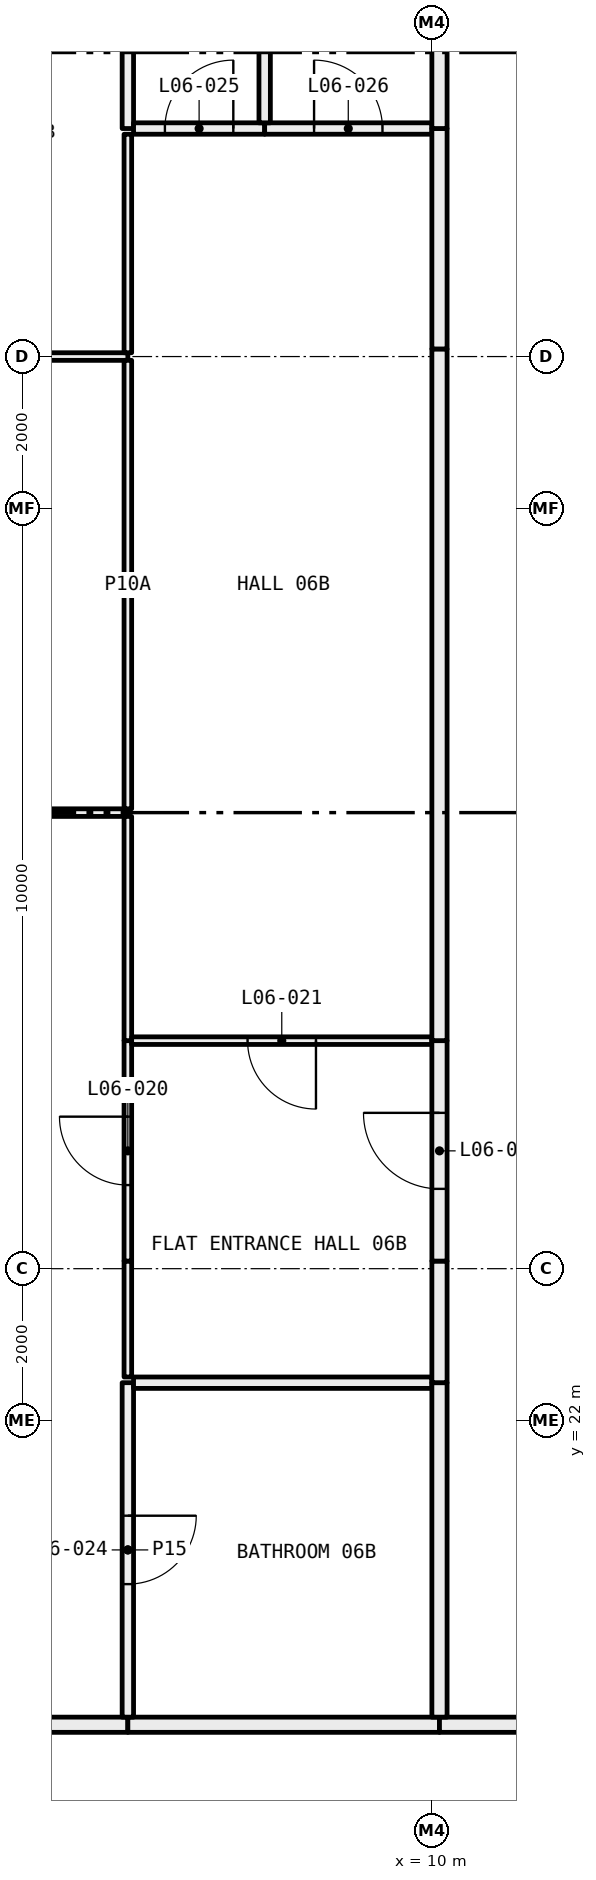
"""IFC4 building model, lengths in metres.
Left out: names, types, materials, properties, quantities, classifications, styles, units other than length and angle.
Written with IfcOpenShell. Run it as: python <this file> out.ifc"""

import sys

from ifc_helpers import new_model, si_unit, direction, frame, frame_2d, origin, place, context, subcontext, project, spatial, rectangle, extrude, element, fill, save


model = new_model("IFC4")
c1 = context("Model", 3, precision=1e-05, world=origin(), true_north=direction((0.0, 1.0)))
c2 = subcontext(c1, "Body", "Model", "MODEL_VIEW")
j1 = project(units=[si_unit("LENGTHUNIT", "METRE"), si_unit("PLANEANGLEUNIT", "RADIAN")], contexts=[c1])
p1 = place(None, origin())
s1 = spatial("IfcSite", under=j1, at=p1, CompositionType="ELEMENT")
p2 = place(p1, origin())
s2 = spatial("IfcBuilding", under=s1, at=p2, CompositionType="ELEMENT")
p3 = place(p2, frame((0.0, 0.0, 33.45)))
s3 = spatial("IfcBuildingStorey", under=s2, at=p3, CompositionType="ELEMENT", Elevation=33.45)
p4 = place(p3, frame((6.0, 18.0, 0.0), z_axis=(0.0, 0.0, 1.0), x_axis=(-1.0, 0.0, 0.0)))
e1 = element("IfcWall", 1, at=p4, inside=s3, PredefinedType="PARTITIONING", context=c2, shape_type="SweptSolid", body=[
    extrude(rectangle(XDim=5.28, YDim=0.2, at=frame_2d((2.64, 0.0))), origin(), (0.0, 0.0, 1.0), 3.05),
])
p5 = place(p3, frame((10.1, 18.0, 0.0), z_axis=(0.0, 0.0, 1.0), x_axis=(-1.0, 0.0, 0.0)))
e2 = element("IfcWall", 2, at=p5, inside=s3, PredefinedType="PARTITIONING", context=c2, shape_type="SweptSolid", body=[
    extrude(rectangle(XDim=4.1, YDim=0.2, at=frame_2d((2.05, 0.0))), origin(), (0.0, 0.0, 1.0), 3.05),
])
p6 = place(p3, frame((13.5, 18.0, 0.0), z_axis=(0.0, 0.0, 1.0), x_axis=(-1.0, 0.0, 0.0)))
e3 = element("IfcWall", 3, at=p6, inside=s3, PredefinedType="PARTITIONING", context=c2, shape_type="SweptSolid", body=[
    extrude(rectangle(XDim=3.4, YDim=0.2, at=frame_2d((1.7, 0.0))), origin(), (0.0, 0.0, 1.0), 3.05),
])
p7 = place(p3, frame((6.0, 30.0, 0.0), z_axis=(0.0, 0.0, 1.0), x_axis=(-1.0, 0.0, 0.0)))
e4 = element("IfcWall", 4, at=p7, inside=s3, PredefinedType="PARTITIONING", context=c2, shape_type="SweptSolid", body=[
    extrude(rectangle(XDim=5.28, YDim=0.1, at=frame_2d((2.64, 0.0))), origin(), (0.0, 0.0, 1.0), 3.05),
])
p8 = place(p7, frame((2.19, 0.0, 0.0)))
e5 = element("IfcOpeningElement", 5, at=p8, cuts=e4, PredefinedType="OPENING", context=c2, shape_type="SweptSolid", body=[
    extrude(rectangle(XDim=0.9, YDim=2.1, at=frame_2d((0.45, 1.05))), frame((0.0, 0.06, 0.0), z_axis=(0.0, -1.0, 0.0), x_axis=(1.0, 0.0, 0.0)), (0.0, 0.0, 1.0), 0.12),
])
p9 = place(p3, frame((6.0, 18.1, 0.0), z_axis=(0.0, 0.0, 1.0), x_axis=(0.0, 1.0, 0.0)))
e6 = element("IfcWall", 6, at=p9, inside=s3, PredefinedType="PARTITIONING", context=c2, shape_type="SweptSolid", body=[
    extrude(rectangle(XDim=4.4, YDim=0.15, at=frame_2d((2.2, 0.0))), origin(), (0.0, 0.0, 1.0), 3.05),
])
p10 = place(p9, frame((1.75, 0.0, 0.0)))
e7 = element("IfcOpeningElement", 7, at=p10, cuts=e6, PredefinedType="OPENING", context=c2, shape_type="SweptSolid", body=[
    extrude(rectangle(XDim=0.9, YDim=2.1, at=frame_2d((0.45, 1.05))), frame((0.0, 0.085, 0.0), z_axis=(0.0, -1.0, 0.0), x_axis=(1.0, 0.0, 0.0)), (0.0, 0.0, 1.0), 0.17),
])
p11 = place(p3, frame((6.0, 22.575, 0.0), z_axis=(0.0, 0.0, 1.0), x_axis=(0.0, 1.0, 0.0)))
e8 = element("IfcWall", 8, at=p11, inside=s3, PredefinedType="PARTITIONING", context=c2, shape_type="SweptSolid", body=[
    extrude(rectangle(XDim=1.525, YDim=0.1, at=frame_2d((0.763, 0.0))), origin(), (0.0, 0.0, 1.0), 2.45),
])
p12 = place(p3, frame((6.0, 24.1, 0.0), z_axis=(0.0, 0.0, 1.0), x_axis=(0.0, 1.0, 0.0)))
e9 = element("IfcWall", 9, at=p12, inside=s3, PredefinedType="PARTITIONING", context=c2, shape_type="SweptSolid", body=[
    extrude(rectangle(XDim=2.9, YDim=0.1, at=frame_2d((1.45, 0.0))), origin(), (0.0, 0.0, 1.0), 3.05),
])
p13 = place(p12, frame((1.0, 0.0, 0.0)))
e10 = element("IfcOpeningElement", 10, at=p13, cuts=e9, PredefinedType="OPENING", context=c2, shape_type="SweptSolid", body=[
    extrude(rectangle(XDim=0.9, YDim=2.1, at=frame_2d((0.45, 1.05))), frame((0.0, 0.06, 0.0), z_axis=(0.0, -1.0, 0.0), x_axis=(1.0, 0.0, 0.0)), (0.0, 0.0, 1.0), 0.12),
])
p14 = place(p3, frame((6.0, 27.0, 0.0), z_axis=(0.0, 0.0, 1.0), x_axis=(0.0, 1.0, 0.0)))
e11 = element("IfcWall", 11, at=p14, inside=s3, PredefinedType="PARTITIONING", context=c2, shape_type="SweptSolid", body=[
    extrude(rectangle(XDim=2.95, YDim=0.1, at=frame_2d((1.475, 0.0))), origin(), (0.0, 0.0, 1.0), 3.05),
])
p15 = place(p3, frame((6.0, 36.0, 0.0), z_axis=(0.0, 0.0, 1.0), x_axis=(-1.0, 0.0, 0.0)))
e12 = element("IfcWall", 12, at=p15, inside=s3, PredefinedType="PARTITIONING", context=c2, shape_type="SweptSolid", body=[
    extrude(rectangle(XDim=5.28, YDim=0.1, at=frame_2d((2.64, 0.0))), origin(), (0.0, 0.0, 1.0), 2.45),
])
p16 = place(p15, frame((2.19, 0.0, 0.0)))
e13 = element("IfcOpeningElement", 13, at=p16, cuts=e12, PredefinedType="OPENING", context=c2, shape_type="SweptSolid", body=[
    extrude(rectangle(XDim=0.9, YDim=2.1, at=frame_2d((0.45, 1.05))), frame((0.0, 0.06, 0.0), z_axis=(0.0, -1.0, 0.0), x_axis=(1.0, 0.0, 0.0)), (0.0, 0.0, 1.0), 0.12),
])
p17 = place(p3, frame((6.0, 30.05, 0.0), z_axis=(0.0, 0.0, 1.0), x_axis=(0.0, 1.0, 0.0)))
e14 = element("IfcWall", 14, at=p17, inside=s3, PredefinedType="PARTITIONING", context=c2, shape_type="SweptSolid", body=[
    extrude(rectangle(XDim=5.9, YDim=0.1, at=frame_2d((2.95, 0.0))), origin(), (0.0, 0.0, 1.0), 2.45),
])
p18 = place(p3, frame((6.0, 36.05, 0.0), z_axis=(0.0, 0.0, 1.0), x_axis=(0.0, 1.0, 0.0)))
e15 = element("IfcWall", 15, at=p18, inside=s3, PredefinedType="PARTITIONING", context=c2, shape_type="SweptSolid", body=[
    extrude(rectangle(XDim=2.875, YDim=0.1, at=frame_2d((1.438, 0.0))), origin(), (0.0, 0.0, 1.0), 2.45),
])
p19 = place(p3, frame((6.0, 39.0, 0.0), z_axis=(0.0, 0.0, 1.0), x_axis=(0.0, 1.0, 0.0)))
e16 = element("IfcWall", 16, at=p19, inside=s3, PredefinedType="PARTITIONING", context=c2, shape_type="SweptSolid", body=[
    extrude(rectangle(XDim=2.28, YDim=0.15, at=frame_2d((1.14, 0.0))), origin(), (0.0, 0.0, 1.0), 3.05),
])
p20 = place(p3, frame((10.0, 22.5, 0.0), z_axis=(0.0, 0.0, 1.0), x_axis=(-1.0, 0.0, 0.0)))
e17 = element("IfcWall", 17, at=p20, inside=s3, PredefinedType="PARTITIONING", context=c2, shape_type="SweptSolid", body=[
    extrude(rectangle(XDim=3.925, YDim=0.15, at=frame_2d((1.962, 0.0))), origin(), (0.0, 0.0, 1.0), 3.05),
])
p21 = place(p3, frame((10.1, 18.1, 0.0), z_axis=(0.0, 0.0, 1.0), x_axis=(0.0, 1.0, 0.0)))
e18 = element("IfcWall", 18, at=p21, inside=s3, PredefinedType="PARTITIONING", context=c2, shape_type="SweptSolid", body=[
    extrude(rectangle(XDim=4.4, YDim=0.2, at=frame_2d((2.2, 0.0))), origin(), (0.0, 0.0, 1.0), 3.05),
])
p22 = place(p3, frame((10.0, 27.0, 0.0), z_axis=(0.0, 0.0, 1.0), x_axis=(-1.0, 0.0, 0.0)))
e19 = element("IfcWall", 19, at=p22, inside=s3, PredefinedType="PARTITIONING", context=c2, shape_type="SweptSolid", body=[
    extrude(rectangle(XDim=3.95, YDim=0.1, at=frame_2d((1.975, 0.0))), origin(), (0.0, 0.0, 1.0), 3.05),
])
p23 = place(p22, frame((1.525, 0.0, 0.0)))
e20 = element("IfcOpeningElement", 20, at=p23, cuts=e19, PredefinedType="OPENING", context=c2, shape_type="SweptSolid", body=[
    extrude(rectangle(XDim=0.9, YDim=2.1, at=frame_2d((0.45, 1.05))), frame((0.0, 0.06, 0.0), z_axis=(0.0, -1.0, 0.0), x_axis=(1.0, 0.0, 0.0)), (0.0, 0.0, 1.0), 0.12),
])
p24 = place(p3, frame((10.1, 22.5, 0.0), z_axis=(0.0, 0.0, 1.0), x_axis=(0.0, 1.0, 0.0)))
e21 = element("IfcWall", 21, at=p24, inside=s3, PredefinedType="PARTITIONING", context=c2, shape_type="SweptSolid", body=[
    extrude(rectangle(XDim=1.6, YDim=0.2, at=frame_2d((0.8, 0.0))), origin(), (0.0, 0.0, 1.0), 2.45),
])
p25 = place(p3, frame((10.1, 24.1, 0.0), z_axis=(0.0, 0.0, 1.0), x_axis=(0.0, 1.0, 0.0)))
e22 = element("IfcWall", 22, at=p25, inside=s3, PredefinedType="PARTITIONING", context=c2, shape_type="SweptSolid", body=[
    extrude(rectangle(XDim=2.9, YDim=0.2, at=frame_2d((1.45, 0.0))), origin(), (0.0, 0.0, 1.0), 3.05),
])
p26 = place(p25, frame((0.95, 0.0, 0.0)))
e23 = element("IfcOpeningElement", 23, at=p26, cuts=e22, PredefinedType="OPENING", context=c2, shape_type="SweptSolid", body=[
    extrude(rectangle(XDim=1.0, YDim=2.1, at=frame_2d((0.5, 1.05))), frame((0.0, 0.11, 0.0), z_axis=(0.0, -1.0, 0.0), x_axis=(1.0, 0.0, 0.0)), (0.0, 0.0, 1.0), 0.22),
])
p27 = place(p3, frame((7.8, 39.0, 0.0), z_axis=(0.0, 0.0, 1.0), x_axis=(-1.0, 0.0, 0.0)))
e24 = element("IfcWall", 24, at=p27, inside=s3, PredefinedType="PARTITIONING", context=c2, shape_type="SweptSolid", body=[
    extrude(rectangle(XDim=1.725, YDim=0.15, at=frame_2d((0.863, 0.0))), origin(), (0.0, 0.0, 1.0), 3.05),
])
p28 = place(p27, frame((0.413, 0.0, 0.0)))
e25 = element("IfcOpeningElement", 25, at=p28, cuts=e24, PredefinedType="OPENING", context=c2, shape_type="SweptSolid", body=[
    extrude(rectangle(XDim=0.9, YDim=2.1, at=frame_2d((0.45, 1.05))), frame((0.0, 0.085, 0.0), z_axis=(0.0, -1.0, 0.0), x_axis=(1.0, 0.0, 0.0)), (0.0, 0.0, 1.0), 0.17),
])
p29 = place(p3, frame((10.0, 39.0, 0.0), z_axis=(0.0, 0.0, 1.0), x_axis=(-1.0, 0.0, 0.0)))
e26 = element("IfcWall", 26, at=p29, inside=s3, PredefinedType="PARTITIONING", context=c2, shape_type="SweptSolid", body=[
    extrude(rectangle(XDim=2.2, YDim=0.15, at=frame_2d((1.1, 0.0))), origin(), (0.0, 0.0, 1.0), 3.05),
])
p30 = place(p29, frame((0.65, 0.0, 0.0)))
e27 = element("IfcOpeningElement", 27, at=p30, cuts=e26, PredefinedType="OPENING", context=c2, shape_type="SweptSolid", body=[
    extrude(rectangle(XDim=0.9, YDim=2.1, at=frame_2d((0.45, 1.05))), frame((0.0, 0.085, 0.0), z_axis=(0.0, -1.0, 0.0), x_axis=(1.0, 0.0, 0.0)), (0.0, 0.0, 1.0), 0.17),
])
p31 = place(p3, frame((10.1, 27.0, 0.0), z_axis=(0.0, 0.0, 1.0), x_axis=(0.0, 1.0, 0.0)))
e28 = element("IfcWall", 28, at=p31, inside=s3, PredefinedType="PARTITIONING", context=c2, shape_type="SweptSolid", body=[
    extrude(rectangle(XDim=9.1, YDim=0.2, at=frame_2d((4.55, 0.0))), origin(), (0.0, 0.0, 1.0), 2.45),
])
p32 = place(p3, frame((10.1, 36.1, 0.0), z_axis=(0.0, 0.0, 1.0), x_axis=(0.0, 1.0, 0.0)))
e29 = element("IfcWall", 29, at=p32, inside=s3, PredefinedType="PARTITIONING", context=c2, shape_type="SweptSolid", body=[
    extrude(rectangle(XDim=2.9, YDim=0.2, at=frame_2d((1.45, 0.0))), origin(), (0.0, 0.0, 1.0), 3.05),
])
p33 = place(p3, frame((7.8, 39.075, 0.0), z_axis=(0.0, 0.0, 1.0), x_axis=(0.0, 1.0, 0.0)))
e30 = element("IfcWall", 30, at=p33, inside=s3, PredefinedType="PARTITIONING", context=c2, shape_type="SweptSolid", body=[
    extrude(rectangle(XDim=2.825, YDim=0.15, at=frame_2d((1.413, 0.0))), origin(), (0.0, 0.0, 1.0), 3.05),
])
p34 = place(p3, frame((10.1, 39.0, 0.0), z_axis=(0.0, 0.0, 1.0), x_axis=(0.0, 1.0, 0.0)))
e31 = element("IfcWall", 31, at=p34, inside=s3, PredefinedType="PARTITIONING", context=c2, shape_type="SweptSolid", body=[
    extrude(rectangle(XDim=2.9, YDim=0.2, at=frame_2d((1.45, 0.0))), origin(), (0.0, 0.0, 1.0), 3.05),
])
p35 = place(p26, origin())
e32 = element("IfcDoor", 32, at=p35, inside=s3, OperationType="SINGLE_SWING_LEFT", PredefinedType="DOOR", context=c2, shape_type="SweptSolid", body=[
    extrude(rectangle(XDim=1.0, YDim=2.1, at=frame_2d((0.5, 1.05))), frame((0.0, 0.025, 0.0), z_axis=(0.0, -1.0, 0.0), x_axis=(1.0, 0.0, 0.0)), (0.0, 0.0, 1.0), 0.05),
])
fill(e23, e32)
p36 = place(p13, origin())
e33 = element("IfcDoor", 33, at=p36, inside=s3, OperationType="SINGLE_SWING_LEFT", PredefinedType="DOOR", context=c2, shape_type="SweptSolid", body=[
    extrude(rectangle(XDim=0.9, YDim=2.1, at=frame_2d((0.45, 1.05))), frame((0.0, 0.025, 0.0), z_axis=(0.0, -1.0, 0.0), x_axis=(1.0, 0.0, 0.0)), (0.0, 0.0, 1.0), 0.05),
])
fill(e10, e33)
p37 = place(p23, origin())
e34 = element("IfcDoor", 34, at=p37, inside=s3, OperationType="SINGLE_SWING_RIGHT", PredefinedType="DOOR", context=c2, shape_type="SweptSolid", body=[
    extrude(rectangle(XDim=0.9, YDim=2.1, at=frame_2d((0.45, 1.05))), frame((0.0, 0.025, 0.0), z_axis=(0.0, -1.0, 0.0), x_axis=(1.0, 0.0, 0.0)), (0.0, 0.0, 1.0), 0.05),
])
fill(e20, e34)
p38 = place(p10, frame((0.9, 0.0, 0.0), x_axis=(-1.0, 0.0, 0.0)))
e35 = element("IfcDoor", 35, at=p38, inside=s3, OperationType="SINGLE_SWING_RIGHT", PredefinedType="DOOR", context=c2, shape_type="SweptSolid", body=[
    extrude(rectangle(XDim=0.9, YDim=2.1, at=frame_2d((0.45, 1.05))), frame((0.0, 0.025, 0.0), z_axis=(0.0, -1.0, 0.0), x_axis=(1.0, 0.0, 0.0)), (0.0, 0.0, 1.0), 0.05),
])
fill(e7, e35)
p39 = place(p28, frame((0.9, 0.0, 0.0), x_axis=(-1.0, 0.0, 0.0)))
e36 = element("IfcDoor", 36, at=p39, inside=s3, OperationType="SINGLE_SWING_LEFT", PredefinedType="DOOR", context=c2, shape_type="SweptSolid", body=[
    extrude(rectangle(XDim=0.9, YDim=2.1, at=frame_2d((0.45, 1.05))), frame((0.0, 0.025, 0.0), z_axis=(0.0, -1.0, 0.0), x_axis=(1.0, 0.0, 0.0)), (0.0, 0.0, 1.0), 0.05),
])
fill(e25, e36)
p40 = place(p30, frame((0.9, 0.0, 0.0), x_axis=(-1.0, 0.0, 0.0)))
e37 = element("IfcDoor", 37, at=p40, inside=s3, OperationType="SINGLE_SWING_RIGHT", PredefinedType="DOOR", context=c2, shape_type="SweptSolid", body=[
    extrude(rectangle(XDim=0.9, YDim=2.1, at=frame_2d((0.45, 1.05))), frame((0.0, 0.025, 0.0), z_axis=(0.0, -1.0, 0.0), x_axis=(1.0, 0.0, 0.0)), (0.0, 0.0, 1.0), 0.05),
])
fill(e27, e37)
save(model, sys.argv[1])
